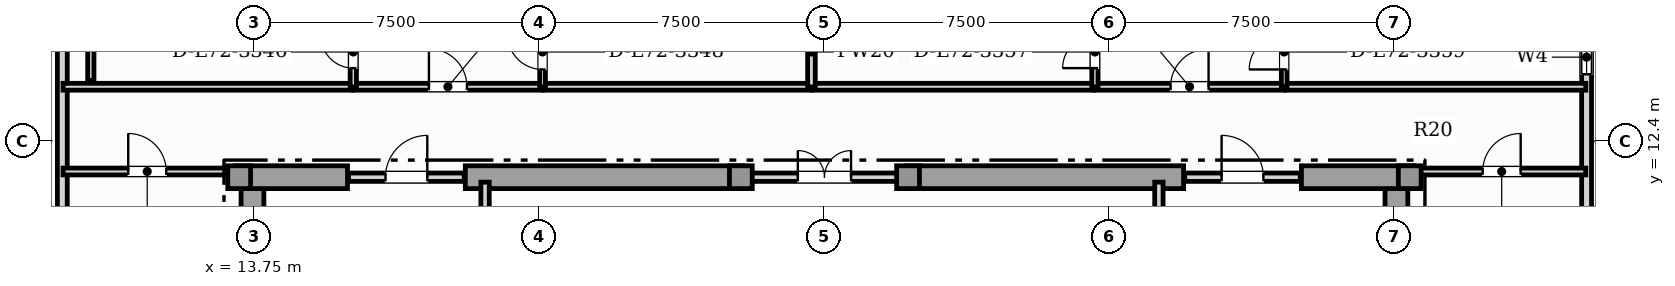
"""IFC4 building model, lengths in metres.
Left out: names, types, materials, properties, quantities, classifications, styles, units other than length and angle.
Written with IfcOpenShell. Run it as: python <this file> out.ifc"""

import sys

from ifc_helpers import new_model, si_unit, direction, frame, frame_2d, origin, origin_2d, place, context, subcontext, project, spatial, rectangle, extrude, element, fill, save


model = new_model("IFC4")
c1 = context("Model", 3, precision=1e-05, world=origin(), true_north=direction((0.0, 1.0)))
c2 = subcontext(c1, "Body", "Model", "MODEL_VIEW")
j1 = project(units=[si_unit("LENGTHUNIT", "METRE"), si_unit("PLANEANGLEUNIT", "RADIAN")], contexts=[c1])
p1 = place(None, origin())
s1 = spatial("IfcSite", under=j1, at=p1, CompositionType="ELEMENT")
p2 = place(p1, origin())
s2 = spatial("IfcBuilding", under=s1, at=p2, CompositionType="ELEMENT")
p3 = place(p2, frame((0.0, 0.0, 292.6)))
s3 = spatial("IfcBuildingStorey", under=s2, at=p3, CompositionType="ELEMENT", Elevation=292.6)
for number, where, z_axis, x_axis in (
    (1, (13.7, 0.92, 0.0), (0.0, 0.0, 1.0), (0.0, 1.0, 0.0)),
    (2, (43.8, 0.92, 0.0), (0.0, 0.0, 1.0), (0.0, 1.0, 0.0)),
):
    element("IfcWall", number, at=place(p3, frame(where, z_axis=z_axis, x_axis=x_axis)), inside=s3, PredefinedType="SHEAR", context=c2, shape_type="SweptSolid", body=[
        extrude(rectangle(XDim=10.53, YDim=0.6, at=frame_2d((5.265, 0.0))), origin(), (0.0, 0.0, 1.0), 3.65),
    ])
p4 = place(p3, frame((13.25, 11.45, 0.0), z_axis=(0.0, 0.0, 1.0), x_axis=(1.0, 0.0, 0.0)))
e3 = element("IfcWall", 3, at=p4, inside=s3, PredefinedType="SHEAR", context=c2, shape_type="SweptSolid", body=[
    extrude(rectangle(XDim=2.95, YDim=0.6, at=frame_2d((1.475, 0.0))), origin(), (0.0, 0.0, 1.0), 3.65),
])
for number, where, z_axis, x_axis in (
    (4, (19.3, 11.45, 0.0), (0.0, 0.0, 1.0), (1.0, 0.0, 0.0)),
    (5, (30.9, 11.45, 0.0), (0.0, 0.0, 1.0), (1.0, 0.0, 0.0)),
):
    element("IfcWall", number, at=place(p3, frame(where, z_axis=z_axis, x_axis=x_axis)), inside=s3, PredefinedType="SHEAR", context=c2, shape_type="SweptSolid", body=[
        extrude(rectangle(XDim=7.3, YDim=0.6, at=frame_2d((3.65, 0.0))), origin(), (0.0, 0.0, 1.0), 3.65),
    ])
p5 = place(p3, frame((41.3, 11.45, 0.0), z_axis=(0.0, 0.0, 1.0), x_axis=(1.0, 0.0, 0.0)))
e6 = element("IfcWall", 6, at=p5, inside=s3, PredefinedType="SHEAR", context=c2, shape_type="SweptSolid", body=[
    extrude(rectangle(XDim=2.95, YDim=0.6, at=frame_2d((1.475, 0.0))), origin(), (0.0, 0.0, 1.0), 3.65),
])
for number, where, z_axis, x_axis in (
    (7, (13.35, 11.45, 0.0), (0.0, 0.0, 1.0), (1.0, 0.0, 0.0)),
    (8, (44.15, 11.45, 0.0), (0.0, 0.0, 1.0), (1.0, 0.0, 0.0)),
    (9, (26.55, 11.45, 0.0), (0.0, 0.0, 1.0), (1.0, 0.0, 0.0)),
    (10, (30.95, 11.45, 0.0), (0.0, 0.0, 1.0), (1.0, 0.0, 0.0)),
):
    element("IfcColumn", number, at=place(p3, frame(where, z_axis=z_axis, x_axis=x_axis)), inside=s3, PredefinedType="COLUMN", context=c2, shape_type="SweptSolid", body=[
        extrude(rectangle(XDim=0.6, YDim=0.6, at=origin_2d()), origin(), (0.0, 0.0, 1.0), 3.85),
    ])
p6 = place(p3, frame((48.804, 3.24, 0.0), z_axis=(0.0, 0.0, 1.0), x_axis=(0.0, 1.0, 0.0)))
e11 = element("IfcWall", 11, at=p6, inside=s3, PredefinedType="SOLIDWALL", context=c2, shape_type="SweptSolid", body=[
    extrude(rectangle(XDim=13.478, YDim=0.26, at=frame_2d((6.739, 0.0))), origin(), (0.0, 0.0, 1.0), 3.65),
])
p7 = place(p6, frame((10.919, 0.0, 0.95)))
e12 = element("IfcOpeningElement", 12, at=p7, cuts=e11, PredefinedType="OPENING", context=c2, shape_type="SweptSolid", body=[
    extrude(rectangle(XDim=0.9, YDim=1.5, at=frame_2d((0.45, 0.75))), frame((0.0, 0.14, 0.0), z_axis=(0.0, -1.0, 0.0), x_axis=(1.0, 0.0, 0.0)), (0.0, 0.0, 1.0), 0.28),
])
p8 = place(p3, frame((8.696, 16.718, 0.0), z_axis=(0.0, 0.0, 1.0), x_axis=(0.0, -1.0, 0.0)))
e13 = element("IfcWall", 13, at=p8, inside=s3, PredefinedType="SOLIDWALL", context=c2, shape_type="SweptSolid", body=[
    extrude(rectangle(XDim=13.478, YDim=0.26, at=frame_2d((6.739, 0.0))), origin(), (0.0, 0.0, 1.0), 3.65),
])
p9 = place(p8, frame((11.798, 0.0, 0.95)))
e14 = element("IfcOpeningElement", 14, at=p9, cuts=e13, PredefinedType="OPENING", context=c2, shape_type="SweptSolid", body=[
    extrude(rectangle(XDim=0.9, YDim=1.5, at=frame_2d((0.45, 0.75))), frame((0.0, 0.14, 0.0), z_axis=(0.0, -1.0, 0.0), x_axis=(1.0, 0.0, 0.0)), (0.0, 0.0, 1.0), 0.28),
])
p10 = place(p3, frame((19.82, 8.52, 0.0), z_axis=(0.0, 0.0, 1.0), x_axis=(0.0, 1.0, 0.0)))
e15 = element("IfcWall", 15, at=p10, inside=s3, PredefinedType="SOLIDWALL", context=c2, shape_type="SweptSolid", body=[
    extrude(rectangle(XDim=2.8, YDim=0.22, at=frame_2d((1.4, 0.0))), origin(), (0.0, 0.0, 1.0), 3.105),
])
p11 = place(p10, frame((0.85, 0.0, 0.0)))
e16 = element("IfcOpeningElement", 16, at=p11, cuts=e15, PredefinedType="OPENING", context=c2, shape_type="SweptSolid", body=[
    extrude(rectangle(XDim=1.1, YDim=2.2, at=frame_2d((0.55, 1.1))), frame((0.0, 0.12, 0.0), z_axis=(0.0, -1.0, 0.0), x_axis=(1.0, 0.0, 0.0)), (0.0, 0.0, 1.0), 0.24),
])
p12 = place(p3, frame((37.55, 8.52, 0.0), z_axis=(0.0, 0.0, 1.0), x_axis=(0.0, 1.0, 0.0)))
e17 = element("IfcWall", 17, at=p12, inside=s3, PredefinedType="SOLIDWALL", context=c2, shape_type="SweptSolid", body=[
    extrude(rectangle(XDim=2.8, YDim=0.22, at=frame_2d((1.4, 0.0))), origin(), (0.0, 0.0, 1.0), 3.105),
])
p13 = place(p12, frame((0.85, 0.0, 0.0)))
e18 = element("IfcOpeningElement", 18, at=p13, cuts=e17, PredefinedType="OPENING", context=c2, shape_type="SweptSolid", body=[
    extrude(rectangle(XDim=1.1, YDim=2.2, at=frame_2d((0.55, 1.1))), frame((0.0, 0.12, 0.0), z_axis=(0.0, -1.0, 0.0), x_axis=(1.0, 0.0, 0.0)), (0.0, 0.0, 1.0), 0.24),
])
p14 = place(p3, frame((16.23, 11.45, 0.0), z_axis=(0.0, 0.0, 1.0), x_axis=(1.0, 0.0, 0.0)))
e19 = element("IfcWall", 19, at=p14, inside=s3, PredefinedType="SOLIDWALL", context=c2, shape_type="SweptSolid", body=[
    extrude(rectangle(XDim=3.04, YDim=0.22, at=frame_2d((1.52, 0.0))), origin(), (0.0, 0.0, 1.0), 3.65),
])
p15 = place(p14, frame((0.97, 0.0, 0.0)))
e20 = element("IfcOpeningElement", 20, at=p15, cuts=e19, PredefinedType="OPENING", context=c2, shape_type="SweptSolid", body=[
    extrude(rectangle(XDim=1.1, YDim=2.2, at=frame_2d((0.55, 1.1))), frame((0.0, 0.12, 0.0), z_axis=(0.0, -1.0, 0.0), x_axis=(1.0, 0.0, 0.0)), (0.0, 0.0, 1.0), 0.24),
])
p16 = place(p3, frame((26.63, 11.45, 0.0), z_axis=(0.0, 0.0, 1.0), x_axis=(1.0, 0.0, 0.0)))
e21 = element("IfcWall", 21, at=p16, inside=s3, PredefinedType="SOLIDWALL", context=c2, shape_type="SweptSolid", body=[
    extrude(rectangle(XDim=4.24, YDim=0.22, at=frame_2d((2.12, 0.0))), origin(), (0.0, 0.0, 1.0), 3.65),
])
p17 = place(p16, frame((1.42, 0.0, 0.0)))
e22 = element("IfcOpeningElement", 22, at=p17, cuts=e21, PredefinedType="OPENING", context=c2, shape_type="SweptSolid", body=[
    extrude(rectangle(XDim=1.4, YDim=2.2, at=frame_2d((0.7, 1.1))), frame((0.0, 0.12, 0.0), z_axis=(0.0, -1.0, 0.0), x_axis=(1.0, 0.0, 0.0)), (0.0, 0.0, 1.0), 0.24),
])
p18 = place(p3, frame((38.23, 11.45, 0.0), z_axis=(0.0, 0.0, 1.0), x_axis=(1.0, 0.0, 0.0)))
e23 = element("IfcWall", 23, at=p18, inside=s3, PredefinedType="SOLIDWALL", context=c2, shape_type="SweptSolid", body=[
    extrude(rectangle(XDim=3.04, YDim=0.22, at=frame_2d((1.52, 0.0))), origin(), (0.0, 0.0, 1.0), 3.65),
])
p19 = place(p18, frame((0.97, 0.0, 0.0)))
e24 = element("IfcOpeningElement", 24, at=p19, cuts=e23, PredefinedType="OPENING", context=c2, shape_type="SweptSolid", body=[
    extrude(rectangle(XDim=1.1, YDim=2.2, at=frame_2d((0.55, 1.1))), frame((0.0, 0.12, 0.0), z_axis=(0.0, -1.0, 0.0), x_axis=(1.0, 0.0, 0.0)), (0.0, 0.0, 1.0), 0.24),
])
p20 = place(p3, frame((8.716, 11.6, 0.0), z_axis=(0.0, 0.0, 1.0), x_axis=(1.0, 0.0, 0.0)))
e25 = element("IfcWall", 25, at=p20, inside=s3, PredefinedType="PARTITIONING", context=c2, shape_type="SweptSolid", body=[
    extrude(rectangle(XDim=4.429, YDim=0.18, at=frame_2d((2.215, 0.0))), origin(), (0.0, 0.0, 1.0), 3.65),
])
p21 = place(p20, frame((1.715, 0.0, 0.0)))
e26 = element("IfcOpeningElement", 26, at=p21, cuts=e25, PredefinedType="OPENING", context=c2, shape_type="SweptSolid", body=[
    extrude(rectangle(XDim=1.0, YDim=2.15, at=frame_2d((0.5, 1.075))), frame((0.0, 0.1, 0.0), z_axis=(0.0, -1.0, 0.0), x_axis=(1.0, 0.0, 0.0)), (0.0, 0.0, 1.0), 0.2),
])
p22 = place(p3, frame((44.355, 11.6, 0.0), z_axis=(0.0, 0.0, 1.0), x_axis=(1.0, 0.0, 0.0)))
e27 = element("IfcWall", 27, at=p22, inside=s3, PredefinedType="PARTITIONING", context=c2, shape_type="SweptSolid", body=[
    extrude(rectangle(XDim=4.429, YDim=0.18, at=frame_2d((2.215, 0.0))), origin(), (0.0, 0.0, 1.0), 3.65),
])
p23 = place(p22, frame((1.715, 0.0, 0.0)))
e28 = element("IfcOpeningElement", 28, at=p23, cuts=e27, PredefinedType="OPENING", context=c2, shape_type="SweptSolid", body=[
    extrude(rectangle(XDim=1.0, YDim=2.15, at=frame_2d((0.5, 1.075))), frame((0.0, 0.1, 0.0), z_axis=(0.0, -1.0, 0.0), x_axis=(1.0, 0.0, 0.0)), (0.0, 0.0, 1.0), 0.2),
])
p24 = place(p3, frame((16.348, 13.83, 0.0), z_axis=(0.0, 0.0, 1.0), x_axis=(1.0, 0.0, 0.0)))
e29 = element("IfcWall", 29, at=p24, inside=s3, PredefinedType="PARTITIONING", context=c2, shape_type="SweptSolid", body=[
    extrude(rectangle(XDim=4.99, YDim=0.18, at=frame_2d((2.495, 0.0))), origin(), (0.0, 0.0, 1.0), 3.65),
])
p25 = place(p24, frame((1.995, 0.0, 0.0)))
e30 = element("IfcOpeningElement", 30, at=p25, cuts=e29, PredefinedType="OPENING", context=c2, shape_type="SweptSolid", body=[
    extrude(rectangle(XDim=1.0, YDim=2.15, at=frame_2d((0.5, 1.075))), frame((0.0, 0.1, 0.0), z_axis=(0.0, -1.0, 0.0), x_axis=(1.0, 0.0, 0.0)), (0.0, 0.0, 1.0), 0.2),
])
p26 = place(p3, frame((8.716, 13.83, 0.0), z_axis=(0.0, 0.0, 1.0), x_axis=(1.0, 0.0, 0.0)))
e31 = element("IfcWall", 31, at=p26, inside=s3, PredefinedType="PARTITIONING", context=c2, shape_type="SweptSolid", body=[
    extrude(rectangle(XDim=7.602, YDim=0.18, at=frame_2d((3.801, 0.0))), origin(), (0.0, 0.0, 1.0), 3.65),
])
p27 = place(p3, frame((21.368, 13.83, 0.0), z_axis=(0.0, 0.0, 1.0), x_axis=(1.0, 0.0, 0.0)))
e32 = element("IfcWall", 32, at=p27, inside=s3, PredefinedType="PARTITIONING", context=c2, shape_type="SweptSolid", body=[
    extrude(rectangle(XDim=7.045, YDim=0.18, at=frame_2d((3.522, 0.0))), origin(), (0.0, 0.0, 1.0), 3.65),
])
p28 = place(p3, frame((35.862, 13.83, 0.0), z_axis=(0.0, 0.0, 1.0), x_axis=(1.0, 0.0, 0.0)))
e33 = element("IfcWall", 33, at=p28, inside=s3, PredefinedType="PARTITIONING", context=c2, shape_type="SweptSolid", body=[
    extrude(rectangle(XDim=4.99, YDim=0.18, at=frame_2d((2.495, 0.0))), origin(), (0.0, 0.0, 1.0), 3.65),
])
p29 = place(p28, frame((1.995, 0.0, 0.0)))
e34 = element("IfcOpeningElement", 34, at=p29, cuts=e33, PredefinedType="OPENING", context=c2, shape_type="SweptSolid", body=[
    extrude(rectangle(XDim=1.0, YDim=2.15, at=frame_2d((0.5, 1.075))), frame((0.0, 0.1, 0.0), z_axis=(0.0, -1.0, 0.0), x_axis=(1.0, 0.0, 0.0)), (0.0, 0.0, 1.0), 0.2),
])
p30 = place(p3, frame((28.443, 13.83, 0.0), z_axis=(0.0, 0.0, 1.0), x_axis=(1.0, 0.0, 0.0)))
e35 = element("IfcWall", 35, at=p30, inside=s3, PredefinedType="PARTITIONING", context=c2, shape_type="SweptSolid", body=[
    extrude(rectangle(XDim=7.389, YDim=0.18, at=frame_2d((3.695, 0.0))), origin(), (0.0, 0.0, 1.0), 3.65),
])
p31 = place(p3, frame((40.882, 13.83, 0.0), z_axis=(0.0, 0.0, 1.0), x_axis=(1.0, 0.0, 0.0)))
e36 = element("IfcWall", 36, at=p31, inside=s3, PredefinedType="PARTITIONING", context=c2, shape_type="SweptSolid", body=[
    extrude(rectangle(XDim=7.902, YDim=0.18, at=frame_2d((3.951, 0.0))), origin(), (0.0, 0.0, 1.0), 3.65),
])
p32 = place(p3, frame((16.353, 13.825, 0.0), z_axis=(0.0, 0.0, 1.0), x_axis=(0.0, 1.0, 0.0)))
e37 = element("IfcWall", 37, at=p32, inside=s3, PredefinedType="PLUMBINGWALL", context=c2, shape_type="SweptSolid", body=[
    extrude(rectangle(XDim=1.84, YDim=0.165, at=frame_2d((0.92, 0.0))), origin(), (0.0, 0.0, 1.0), 3.65),
])
p33 = place(p32, frame((0.495, 0.0, 0.0)))
e38 = element("IfcOpeningElement", 38, at=p33, cuts=e37, PredefinedType="OPENING", context=c2, shape_type="SweptSolid", body=[
    extrude(rectangle(XDim=0.85, YDim=2.1, at=frame_2d((0.425, 1.05))), frame((0.0, 0.093, 0.0), z_axis=(0.0, -1.0, 0.0), x_axis=(1.0, 0.0, 0.0)), (0.0, 0.0, 1.0), 0.185),
])
p34 = place(p3, frame((21.333, 13.825, 0.0), z_axis=(0.0, 0.0, 1.0), x_axis=(0.0, 1.0, 0.0)))
e39 = element("IfcWall", 39, at=p34, inside=s3, PredefinedType="PARTITIONING", context=c2, shape_type="SweptSolid", body=[
    extrude(rectangle(XDim=1.84, YDim=0.15, at=frame_2d((0.92, 0.0))), origin(), (0.0, 0.0, 1.0), 3.295),
])
p35 = place(p34, frame((0.46, 0.0, 0.0)))
e40 = element("IfcOpeningElement", 40, at=p35, cuts=e39, PredefinedType="OPENING", context=c2, shape_type="SweptSolid", body=[
    extrude(rectangle(XDim=0.92, YDim=2.1, at=frame_2d((0.46, 1.05))), frame((0.0, 0.085, 0.0), z_axis=(0.0, -1.0, 0.0), x_axis=(1.0, 0.0, 0.0)), (0.0, 0.0, 1.0), 0.17),
])
p36 = place(p3, frame((28.408, 13.825, 0.0), z_axis=(0.0, 0.0, 1.0), x_axis=(0.0, 1.0, 0.0)))
e41 = element("IfcWall", 41, at=p36, inside=s3, PredefinedType="PARTITIONING", context=c2, shape_type="SweptSolid", body=[
    extrude(rectangle(XDim=1.84, YDim=0.2, at=frame_2d((0.92, 0.0))), origin(), (0.0, 0.0, 1.0), 3.65),
])
p37 = place(p3, frame((35.867, 13.825, 0.0), z_axis=(0.0, 0.0, 1.0), x_axis=(0.0, 1.0, 0.0)))
e42 = element("IfcWall", 42, at=p37, inside=s3, PredefinedType="PLUMBINGWALL", context=c2, shape_type="SweptSolid", body=[
    extrude(rectangle(XDim=1.84, YDim=0.165, at=frame_2d((0.92, 0.0))), origin(), (0.0, 0.0, 1.0), 3.65),
])
p38 = place(p37, frame((0.495, 0.0, 0.0)))
e43 = element("IfcOpeningElement", 43, at=p38, cuts=e42, PredefinedType="OPENING", context=c2, shape_type="SweptSolid", body=[
    extrude(rectangle(XDim=0.85, YDim=2.1, at=frame_2d((0.425, 1.05))), frame((0.0, 0.093, 0.0), z_axis=(0.0, -1.0, 0.0), x_axis=(1.0, 0.0, 0.0)), (0.0, 0.0, 1.0), 0.185),
])
p39 = place(p3, frame((40.847, 13.825, 0.0), z_axis=(0.0, 0.0, 1.0), x_axis=(0.0, 1.0, 0.0)))
e44 = element("IfcWall", 44, at=p39, inside=s3, PredefinedType="PARTITIONING", context=c2, shape_type="SweptSolid", body=[
    extrude(rectangle(XDim=1.84, YDim=0.15, at=frame_2d((0.92, 0.0))), origin(), (0.0, 0.0, 1.0), 3.65),
])
p40 = place(p39, frame((0.46, 0.0, 0.0)))
e45 = element("IfcOpeningElement", 45, at=p40, cuts=e44, PredefinedType="OPENING", context=c2, shape_type="SweptSolid", body=[
    extrude(rectangle(XDim=0.92, YDim=2.1, at=frame_2d((0.46, 1.05))), frame((0.0, 0.085, 0.0), z_axis=(0.0, -1.0, 0.0), x_axis=(1.0, 0.0, 0.0)), (0.0, 0.0, 1.0), 0.17),
])
p41 = place(p3, frame((9.446, 13.995, 0.0), z_axis=(0.0, 0.0, 1.0), x_axis=(0.0, 1.0, 0.0)))
e46 = element("IfcWall", 46, at=p41, inside=s3, PredefinedType="PLUMBINGWALL", context=c2, shape_type="SweptSolid", body=[
    extrude(rectangle(XDim=2.613, YDim=0.165, at=frame_2d((1.307, 0.0))), origin(), (0.0, 0.0, 1.0), 3.65),
])
p42 = place(p7, origin())
e47 = element("IfcWindow", 47, at=p42, inside=s3, PartitioningType="SINGLE_PANEL", PredefinedType="WINDOW", context=c2, shape_type="SweptSolid", body=[
    extrude(rectangle(XDim=0.9, YDim=1.5, at=frame_2d((0.45, 0.75))), frame((0.0, 0.03, 0.0), z_axis=(0.0, -1.0, 0.0), x_axis=(1.0, 0.0, 0.0)), (0.0, 0.0, 1.0), 0.06),
])
fill(e12, e47)
p43 = place(p15, origin())
e48 = element("IfcDoor", 48, at=p43, inside=s3, OperationType="SINGLE_SWING_RIGHT", PredefinedType="DOOR", context=c2, shape_type="SweptSolid", body=[
    extrude(rectangle(XDim=1.1, YDim=2.2, at=frame_2d((0.55, 1.1))), frame((0.0, 0.025, 0.0), z_axis=(0.0, -1.0, 0.0), x_axis=(1.0, 0.0, 0.0)), (0.0, 0.0, 1.0), 0.05),
])
fill(e20, e48)
p44 = place(p17, origin())
e49 = element("IfcDoor", 49, at=p44, inside=s3, OperationType="DOUBLE_DOOR_SINGLE_SWING", PredefinedType="DOOR", context=c2, shape_type="SweptSolid", body=[
    extrude(rectangle(XDim=1.4, YDim=2.2, at=frame_2d((0.7, 1.1))), frame((0.0, 0.025, 0.0), z_axis=(0.0, -1.0, 0.0), x_axis=(1.0, 0.0, 0.0)), (0.0, 0.0, 1.0), 0.05),
])
fill(e22, e49)
p45 = place(p19, origin())
e50 = element("IfcDoor", 50, at=p45, inside=s3, OperationType="SINGLE_SWING_LEFT", PredefinedType="DOOR", context=c2, shape_type="SweptSolid", body=[
    extrude(rectangle(XDim=1.1, YDim=2.2, at=frame_2d((0.55, 1.1))), frame((0.0, 0.025, 0.0), z_axis=(0.0, -1.0, 0.0), x_axis=(1.0, 0.0, 0.0)), (0.0, 0.0, 1.0), 0.05),
])
fill(e24, e50)
p46 = place(p21, origin())
e51 = element("IfcDoor", 51, at=p46, inside=s3, OperationType="SINGLE_SWING_LEFT", PredefinedType="DOOR", context=c2, shape_type="SweptSolid", body=[
    extrude(rectangle(XDim=1.0, YDim=2.15, at=frame_2d((0.5, 1.075))), frame((0.0, 0.025, 0.0), z_axis=(0.0, -1.0, 0.0), x_axis=(1.0, 0.0, 0.0)), (0.0, 0.0, 1.0), 0.05),
])
fill(e26, e51)
p47 = place(p23, origin())
e52 = element("IfcDoor", 52, at=p47, inside=s3, OperationType="SINGLE_SWING_RIGHT", PredefinedType="DOOR", context=c2, shape_type="SweptSolid", body=[
    extrude(rectangle(XDim=1.0, YDim=2.15, at=frame_2d((0.5, 1.075))), frame((0.0, 0.025, 0.0), z_axis=(0.0, -1.0, 0.0), x_axis=(1.0, 0.0, 0.0)), (0.0, 0.0, 1.0), 0.05),
])
fill(e28, e52)
p48 = place(p25, origin())
e53 = element("IfcDoor", 53, at=p48, inside=s3, OperationType="SINGLE_SWING_LEFT", PredefinedType="DOOR", context=c2, shape_type="SweptSolid", body=[
    extrude(rectangle(XDim=1.0, YDim=2.15, at=frame_2d((0.5, 1.075))), frame((0.0, 0.025, 0.0), z_axis=(0.0, -1.0, 0.0), x_axis=(1.0, 0.0, 0.0)), (0.0, 0.0, 1.0), 0.05),
])
fill(e30, e53)
p49 = place(p29, origin())
e54 = element("IfcDoor", 54, at=p49, inside=s3, OperationType="SINGLE_SWING_RIGHT", PredefinedType="DOOR", context=c2, shape_type="SweptSolid", body=[
    extrude(rectangle(XDim=1.0, YDim=2.15, at=frame_2d((0.5, 1.075))), frame((0.0, 0.025, 0.0), z_axis=(0.0, -1.0, 0.0), x_axis=(1.0, 0.0, 0.0)), (0.0, 0.0, 1.0), 0.05),
])
fill(e34, e54)
p50 = place(p33, origin())
e55 = element("IfcDoor", 55, at=p50, inside=s3, OperationType="SINGLE_SWING_RIGHT", PredefinedType="DOOR", context=c2, shape_type="SweptSolid", body=[
    extrude(rectangle(XDim=0.85, YDim=2.1, at=frame_2d((0.425, 1.05))), frame((0.0, 0.025, 0.0), z_axis=(0.0, -1.0, 0.0), x_axis=(1.0, 0.0, 0.0)), (0.0, 0.0, 1.0), 0.05),
])
fill(e38, e55)
p51 = place(p35, origin())
e56 = element("IfcDoor", 56, at=p51, inside=s3, OperationType="SINGLE_SWING_RIGHT", PredefinedType="DOOR", context=c2, shape_type="SweptSolid", body=[
    extrude(rectangle(XDim=0.92, YDim=2.1, at=frame_2d((0.46, 1.05))), frame((0.0, 0.025, 0.0), z_axis=(0.0, -1.0, 0.0), x_axis=(1.0, 0.0, 0.0)), (0.0, 0.0, 1.0), 0.05),
])
fill(e40, e56)
p52 = place(p38, origin())
e57 = element("IfcDoor", 57, at=p52, inside=s3, OperationType="SINGLE_SWING_LEFT", PredefinedType="DOOR", context=c2, shape_type="SweptSolid", body=[
    extrude(rectangle(XDim=0.85, YDim=2.1, at=frame_2d((0.425, 1.05))), frame((0.0, 0.025, 0.0), z_axis=(0.0, -1.0, 0.0), x_axis=(1.0, 0.0, 0.0)), (0.0, 0.0, 1.0), 0.05),
])
fill(e43, e57)
p53 = place(p40, origin())
e58 = element("IfcDoor", 58, at=p53, inside=s3, OperationType="SINGLE_SWING_LEFT", PredefinedType="DOOR", context=c2, shape_type="SweptSolid", body=[
    extrude(rectangle(XDim=0.92, YDim=2.1, at=frame_2d((0.46, 1.05))), frame((0.0, 0.025, 0.0), z_axis=(0.0, -1.0, 0.0), x_axis=(1.0, 0.0, 0.0)), (0.0, 0.0, 1.0), 0.05),
])
fill(e45, e58)
save(model, sys.argv[1])
